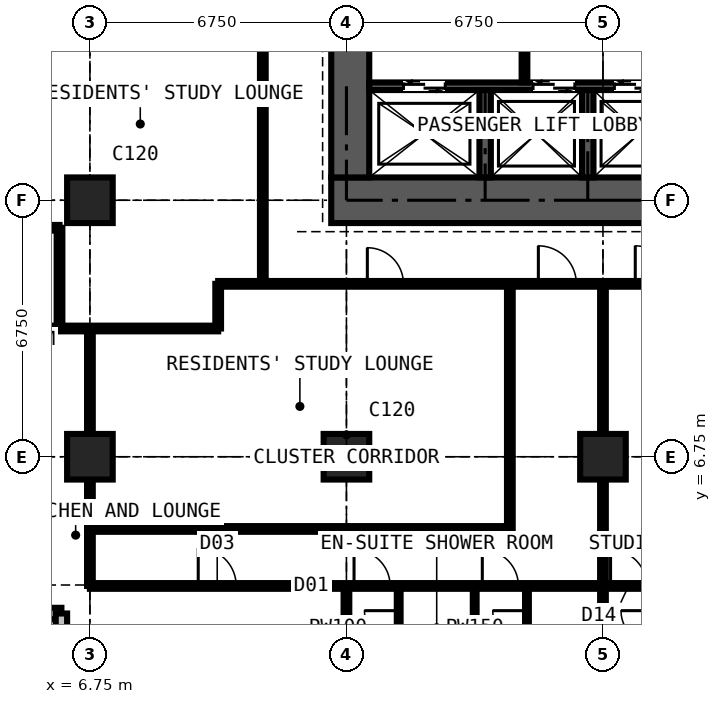
"""IFC4 building model, lengths in metres.
Left out: names, types, materials, properties, quantities, classifications, styles, units other than length and angle.
Written with IfcOpenShell. Run it as: python <this file> out.ifc"""

import sys

from ifc_helpers import new_model, si_unit, direction, frame, frame_2d, origin, origin_2d, place, context, subcontext, project, spatial, rectangle, extrude, element, fill, save


model = new_model("IFC4")
c1 = context("Model", 3, precision=1e-05, world=origin(), true_north=direction((0.0, 1.0)))
c2 = subcontext(c1, "Body", "Model", "MODEL_VIEW")
j1 = project(units=[si_unit("LENGTHUNIT", "METRE"), si_unit("PLANEANGLEUNIT", "RADIAN")], contexts=[c1])
p1 = place(None, origin())
s1 = spatial("IfcSite", under=j1, at=p1, CompositionType="ELEMENT")
p2 = place(p1, origin())
s2 = spatial("IfcBuilding", under=s1, at=p2, CompositionType="ELEMENT")
p3 = place(p2, frame((0.0, 0.0, 189.0)))
s3 = spatial("IfcBuildingStorey", under=s2, at=p3, CompositionType="ELEMENT", Elevation=189.0)
for number, where, z_axis, x_axis in (
    (1, (6.75, 6.75, 0.0), (0.0, 0.0, 1.0), (1.0, 0.0, 0.0)),
    (2, (6.75, 13.5, 0.0), (0.0, 0.0, 1.0), (1.0, 0.0, 0.0)),
    (3, (13.5, 6.75, 0.0), (0.0, 0.0, 1.0), (1.0, 0.0, 0.0)),
    (4, (20.25, 6.75, 0.0), (0.0, 0.0, 1.0), (1.0, 0.0, 0.0)),
):
    element("IfcColumn", number, at=place(p3, frame(where, z_axis=z_axis, x_axis=x_axis)), inside=s3, PredefinedType="COLUMN", context=c2, shape_type="SweptSolid", body=[
        extrude(rectangle(XDim=1.2, YDim=1.2, at=origin_2d()), origin(), (0.0, 0.0, 1.0), 3.6),
    ])
p4 = place(p3, frame((13.1, 13.5, 0.0), z_axis=(0.0, 0.0, 1.0), x_axis=(1.0, 0.0, 0.0)))
e5 = element("IfcWall", 5, at=p4, inside=s3, PredefinedType="SHEAR", context=c2, shape_type="SweptSolid", body=[
    extrude(rectangle(XDim=14.3, YDim=1.2, at=frame_2d((7.15, 0.0))), origin(), (0.0, 0.0, 1.0), 3.6),
])
p5 = place(p3, frame((13.6, 26.4, 0.0), z_axis=(0.0, 0.0, 1.0), x_axis=(0.0, -1.0, 0.0)))
e6 = element("IfcWall", 6, at=p5, inside=s3, PredefinedType="SHEAR", context=c2, shape_type="SweptSolid", body=[
    extrude(rectangle(XDim=12.3, YDim=1.0, at=frame_2d((6.15, 0.0))), origin(), (0.0, 0.0, 1.0), 3.6),
])
p6 = place(p5, frame((7.45, 0.0, 0.0)))
e7 = element("IfcOpeningElement", 7, at=p6, cuts=e6, PredefinedType="OPENING", context=c2, shape_type="SweptSolid", body=[
    extrude(rectangle(XDim=1.2, YDim=2.2, at=frame_2d((0.6, 1.1))), frame((0.0, 0.51, 0.0), z_axis=(0.0, -1.0, 0.0), x_axis=(1.0, 0.0, 0.0)), (0.0, 0.0, 1.0), 1.02),
])
p7 = place(p3, frame((2.625, 2.625, 0.0), z_axis=(0.0, 0.0, 1.0), x_axis=(1.0, 0.0, 0.0)))
e8 = element("IfcWall", 8, at=p7, inside=s3, PredefinedType="SOLIDWALL", context=c2, shape_type="SweptSolid", body=[
    extrude(rectangle(XDim=3.375, YDim=0.3, at=frame_2d((1.688, 0.0))), origin(), (0.0, 0.0, 1.0), 3.375),
])
p8 = place(p7, frame((0.788, 0.0, 0.6)))
e9 = element("IfcOpeningElement", 9, at=p8, cuts=e8, PredefinedType="OPENING", context=c2, shape_type="SweptSolid", body=[
    extrude(rectangle(XDim=1.8, YDim=2.1, at=frame_2d((0.9, 1.05))), frame((0.0, 0.16, 0.0), z_axis=(0.0, -1.0, 0.0), x_axis=(1.0, 0.0, 0.0)), (0.0, 0.0, 1.0), 0.32),
])
p9 = place(p3, frame((6.0, 2.625, 0.0), z_axis=(0.0, 0.0, 1.0), x_axis=(0.0, -1.0, 0.0)))
e10 = element("IfcWall", 10, at=p9, inside=s3, PredefinedType="SOLIDWALL", context=c2, shape_type="SweptSolid", body=[
    extrude(rectangle(XDim=3.375, YDim=0.3, at=frame_2d((1.688, 0.0))), origin(), (0.0, 0.0, 1.0), 3.375),
])
p10 = place(p9, frame((0.788, 0.0, 0.6)))
e11 = element("IfcOpeningElement", 11, at=p10, cuts=e10, PredefinedType="OPENING", context=c2, shape_type="SweptSolid", body=[
    extrude(rectangle(XDim=1.8, YDim=2.1, at=frame_2d((0.9, 1.05))), frame((0.0, 0.16, 0.0), z_axis=(0.0, -1.0, 0.0), x_axis=(1.0, 0.0, 0.0)), (0.0, 0.0, 1.0), 0.32),
])
p11 = place(p3, frame((14.1, 16.5, 0.0), z_axis=(0.0, 0.0, 1.0), x_axis=(1.0, 0.0, 0.0)))
e12 = element("IfcWall", 12, at=p11, inside=s3, PredefinedType="SHEAR", context=c2, shape_type="SweptSolid", body=[
    extrude(rectangle(XDim=12.3, YDim=0.2, at=frame_2d((6.15, 0.0))), origin(), (0.0, 0.0, 1.0), 3.6),
])
p12 = place(p11, frame((0.9, 0.0, 0.0)))
e13 = element("IfcOpeningElement", 13, at=p12, cuts=e12, PredefinedType="OPENING", context=c2, shape_type="SweptSolid", body=[
    extrude(rectangle(XDim=1.1, YDim=2.2, at=frame_2d((0.55, 1.1))), frame((0.0, 0.11, 0.0), z_axis=(0.0, -1.0, 0.0), x_axis=(1.0, 0.0, 0.0)), (0.0, 0.0, 1.0), 0.22),
])
p13 = place(p11, frame((4.31, 0.0, 0.0)))
e14 = element("IfcOpeningElement", 14, at=p13, cuts=e12, PredefinedType="OPENING", context=c2, shape_type="SweptSolid", body=[
    extrude(rectangle(XDim=1.1, YDim=2.2, at=frame_2d((0.55, 1.1))), frame((0.0, 0.11, 0.0), z_axis=(0.0, -1.0, 0.0), x_axis=(1.0, 0.0, 0.0)), (0.0, 0.0, 1.0), 0.22),
])
p14 = place(p11, frame((6.45, 0.0, 0.0)))
e15 = element("IfcOpeningElement", 15, at=p14, cuts=e12, PredefinedType="OPENING", context=c2, shape_type="SweptSolid", body=[
    extrude(rectangle(XDim=1.1, YDim=2.2, at=frame_2d((0.55, 1.1))), frame((0.0, 0.11, 0.0), z_axis=(0.0, -1.0, 0.0), x_axis=(1.0, 0.0, 0.0)), (0.0, 0.0, 1.0), 0.22),
])
p15 = place(p11, frame((9.5, 0.0, 0.0)))
e16 = element("IfcOpeningElement", 16, at=p15, cuts=e12, PredefinedType="OPENING", context=c2, shape_type="SweptSolid", body=[
    extrude(rectangle(XDim=1.1, YDim=2.2, at=frame_2d((0.55, 1.1))), frame((0.0, 0.11, 0.0), z_axis=(0.0, -1.0, 0.0), x_axis=(1.0, 0.0, 0.0)), (0.0, 0.0, 1.0), 0.22),
])
for number, where, z_axis, x_axis in (
    (17, (17.15, 14.1, 0.0), (0.0, 0.0, 1.0), (0.0, 1.0, 0.0)),
    (18, (19.85, 14.1, 0.0), (0.0, 0.0, 1.0), (0.0, 1.0, 0.0)),
):
    element("IfcWall", number, at=place(p3, frame(where, z_axis=z_axis, x_axis=x_axis)), inside=s3, PredefinedType="SHEAR", context=c2, shape_type="SweptSolid", body=[
        extrude(rectangle(XDim=2.3, YDim=0.3, at=frame_2d((1.15, 0.0))), origin(), (0.0, 0.0, 1.0), 3.6),
    ])
p16 = place(p3, frame((18.185, 16.6, 0.0), z_axis=(0.0, 0.0, 1.0), x_axis=(0.0, 1.0, 0.0)))
e19 = element("IfcWall", 19, at=p16, inside=s3, PredefinedType="PARTITIONING", context=c2, shape_type="SweptSolid", body=[
    extrude(rectangle(XDim=3.5, YDim=0.15, at=frame_2d((1.75, 0.0))), origin(), (0.0, 0.0, 1.0), 3.375),
])
p17 = place(p16, frame((1.15, 0.0, 0.0)))
e20 = element("IfcOpeningElement", 20, at=p17, cuts=e19, PredefinedType="OPENING", context=c2, shape_type="SweptSolid", body=[
    extrude(rectangle(XDim=1.2, YDim=2.2, at=frame_2d((0.6, 1.1))), frame((0.0, 0.085, 0.0), z_axis=(0.0, -1.0, 0.0), x_axis=(1.0, 0.0, 0.0)), (0.0, 0.0, 1.0), 0.17),
])
p18 = place(p3, frame((-0.734, 10.125, 0.0), z_axis=(0.0, 0.0, 1.0), x_axis=(1.0, 0.0, 0.0)))
e21 = element("IfcWall", 21, at=p18, inside=s3, PredefinedType="PARTITIONING", context=c2, shape_type="SweptSolid", body=[
    extrude(rectangle(XDim=10.859, YDim=0.15, at=frame_2d((5.429, 0.0))), origin(), (0.0, 0.0, 1.0), 3.375),
])
p19 = place(p3, frame((4.85, 12.775, 0.0), z_axis=(0.0, 0.0, 1.0), x_axis=(1.0, 0.0, 0.0)))
e22 = element("IfcWall", 22, at=p19, inside=s3, PredefinedType="PARTITIONING", context=c2, shape_type="SweptSolid", body=[
    extrude(rectangle(XDim=1.1, YDim=0.15, at=frame_2d((0.55, 0.0))), origin(), (0.0, 0.0, 1.0), 3.375),
])
p20 = place(p3, frame((5.95, 10.125, 0.0), z_axis=(0.0, 0.0, 1.0), x_axis=(0.0, 1.0, 0.0)))
e23 = element("IfcWall", 23, at=p20, inside=s3, PredefinedType="PARTITIONING", context=c2, shape_type="SweptSolid", body=[
    extrude(rectangle(XDim=2.65, YDim=0.15, at=frame_2d((1.325, 0.0))), origin(), (0.0, 0.0, 1.0), 3.375),
])
p21 = place(p3, frame((6.75, 3.35, 0.0), z_axis=(0.0, 0.0, 1.0), x_axis=(0.0, 1.0, 0.0)))
e24 = element("IfcWall", 24, at=p21, inside=s3, PredefinedType="PARTITIONING", context=c2, shape_type="SweptSolid", body=[
    extrude(rectangle(XDim=6.775, YDim=0.15, at=frame_2d((3.387, 0.0))), origin(), (0.0, 0.0, 1.0), 2.877),
])
p22 = place(p3, frame((6.75, 3.35, 0.0), z_axis=(0.0, 0.0, 1.0), x_axis=(1.0, 0.0, 0.0)))
e25 = element("IfcWall", 25, at=p22, inside=s3, PredefinedType="PARTITIONING", context=c2, shape_type="SweptSolid", body=[
    extrude(rectangle(XDim=20.25, YDim=0.15, at=frame_2d((10.125, 0.0))), origin(), (0.0, 0.0, 1.0), 3.375),
])
p23 = place(p22, frame((2.85, 0.0, 0.0)))
e26 = element("IfcOpeningElement", 26, at=p23, cuts=e25, PredefinedType="OPENING", context=c2, shape_type="SweptSolid", body=[
    extrude(rectangle(XDim=1.0, YDim=2.2, at=frame_2d((0.5, 1.1))), frame((0.0, 0.085, 0.0), z_axis=(0.0, -1.0, 0.0), x_axis=(1.0, 0.0, 0.0)), (0.0, 0.0, 1.0), 0.17),
])
p24 = place(p22, frame((6.95, 0.0, 0.0)))
e27 = element("IfcOpeningElement", 27, at=p24, cuts=e25, PredefinedType="OPENING", context=c2, shape_type="SweptSolid", body=[
    extrude(rectangle(XDim=0.95, YDim=2.2, at=frame_2d((0.475, 1.1))), frame((0.0, 0.085, 0.0), z_axis=(0.0, -1.0, 0.0), x_axis=(1.0, 0.0, 0.0)), (0.0, 0.0, 1.0), 0.17),
])
p25 = place(p22, frame((10.325, 0.0, 0.0)))
e28 = element("IfcOpeningElement", 28, at=p25, cuts=e25, PredefinedType="OPENING", context=c2, shape_type="SweptSolid", body=[
    extrude(rectangle(XDim=0.95, YDim=2.2, at=frame_2d((0.475, 1.1))), frame((0.0, 0.085, 0.0), z_axis=(0.0, -1.0, 0.0), x_axis=(1.0, 0.0, 0.0)), (0.0, 0.0, 1.0), 0.17),
])
p26 = place(p22, frame((13.7, 0.0, 0.0)))
e29 = element("IfcOpeningElement", 29, at=p26, cuts=e25, PredefinedType="OPENING", context=c2, shape_type="SweptSolid", body=[
    extrude(rectangle(XDim=0.95, YDim=2.2, at=frame_2d((0.475, 1.1))), frame((0.0, 0.085, 0.0), z_axis=(0.0, -1.0, 0.0), x_axis=(1.0, 0.0, 0.0)), (0.0, 0.0, 1.0), 0.17),
])
p27 = place(p22, frame((17.075, 0.0, 0.0)))
e30 = element("IfcOpeningElement", 30, at=p27, cuts=e25, PredefinedType="OPENING", context=c2, shape_type="SweptSolid", body=[
    extrude(rectangle(XDim=0.95, YDim=2.2, at=frame_2d((0.475, 1.1))), frame((0.0, 0.085, 0.0), z_axis=(0.0, -1.0, 0.0), x_axis=(1.0, 0.0, 0.0)), (0.0, 0.0, 1.0), 0.17),
])
p28 = place(p3, frame((6.75, 4.85, 0.0), z_axis=(0.0, 0.0, 1.0), x_axis=(1.0, 0.0, 0.0)))
e31 = element("IfcWall", 31, at=p28, inside=s3, PredefinedType="PARTITIONING", context=c2, shape_type="SweptSolid", body=[
    extrude(rectangle(XDim=11.05, YDim=0.15, at=frame_2d((5.525, 0.0))), origin(), (0.0, 0.0, 1.0), 3.375),
])
p29 = place(p3, frame((10.125, 10.125, 0.0), z_axis=(0.0, 0.0, 1.0), x_axis=(0.0, 1.0, 0.0)))
e32 = element("IfcWall", 32, at=p29, inside=s3, PredefinedType="PARTITIONING", context=c2, shape_type="SweptSolid", body=[
    extrude(rectangle(XDim=1.175, YDim=0.15, at=frame_2d((0.587, 0.0))), origin(), (0.0, 0.0, 1.0), 3.375),
])
p30 = place(p3, frame((10.125, 11.3, 0.0), z_axis=(0.0, 0.0, 1.0), x_axis=(1.0, 0.0, 0.0)))
e33 = element("IfcWall", 33, at=p30, inside=s3, PredefinedType="PARTITIONING", context=c2, shape_type="SweptSolid", body=[
    extrude(rectangle(XDim=20.475, YDim=0.15, at=frame_2d((10.238, 0.0))), origin(), (0.0, 0.0, 1.0), 3.375),
])
p31 = place(p30, frame((8.425, 0.0, 0.0)))
e34 = element("IfcOpeningElement", 34, at=p31, cuts=e33, PredefinedType="OPENING", context=c2, shape_type="SweptSolid", body=[
    extrude(rectangle(XDim=1.0, YDim=2.2, at=frame_2d((0.5, 1.1))), frame((0.0, 0.085, 0.0), z_axis=(0.0, -1.0, 0.0), x_axis=(1.0, 0.0, 0.0)), (0.0, 0.0, 1.0), 0.17),
])
p32 = place(p30, frame((10.975, 0.0, 0.0)))
e35 = element("IfcOpeningElement", 35, at=p32, cuts=e33, PredefinedType="OPENING", context=c2, shape_type="SweptSolid", body=[
    extrude(rectangle(XDim=1.0, YDim=2.2, at=frame_2d((0.5, 1.1))), frame((0.0, 0.085, 0.0), z_axis=(0.0, -1.0, 0.0), x_axis=(1.0, 0.0, 0.0)), (0.0, 0.0, 1.0), 0.17),
])
p33 = place(p30, frame((3.925, 0.0, 0.0)))
e36 = element("IfcOpeningElement", 36, at=p33, cuts=e33, PredefinedType="OPENING", context=c2, shape_type="SweptSolid", body=[
    extrude(rectangle(XDim=0.95, YDim=2.2, at=frame_2d((0.475, 1.1))), frame((0.0, 0.085, 0.0), z_axis=(0.0, -1.0, 0.0), x_axis=(1.0, 0.0, 0.0)), (0.0, 0.0, 1.0), 0.17),
])
p34 = place(p3, frame((11.3, 11.3, 0.0), z_axis=(0.0, 0.0, 1.0), x_axis=(0.0, 1.0, 0.0)))
e37 = element("IfcWall", 37, at=p34, inside=s3, PredefinedType="PARTITIONING", context=c2, shape_type="SweptSolid", body=[
    extrude(rectangle(XDim=19.3, YDim=0.15, at=frame_2d((9.65, 0.0))), origin(), (0.0, 0.0, 1.0), 3.375),
])
p35 = place(p34, frame((18.1, 0.0, 0.0)))
e38 = element("IfcOpeningElement", 38, at=p35, cuts=e37, PredefinedType="OPENING", context=c2, shape_type="SweptSolid", body=[
    extrude(rectangle(XDim=1.0, YDim=2.2, at=frame_2d((0.5, 1.1))), frame((0.0, 0.085, 0.0), z_axis=(0.0, -1.0, 0.0), x_axis=(1.0, 0.0, 0.0)), (0.0, 0.0, 1.0), 0.17),
])
p36 = place(p34, frame((10.137, 0.0, 0.0)))
e39 = element("IfcOpeningElement", 39, at=p36, cuts=e37, PredefinedType="OPENING", context=c2, shape_type="SweptSolid", body=[
    extrude(rectangle(XDim=1.0, YDim=2.2, at=frame_2d((0.5, 1.1))), frame((0.0, 0.085, 0.0), z_axis=(0.0, -1.0, 0.0), x_axis=(1.0, 0.0, 0.0)), (0.0, 0.0, 1.0), 0.17),
])
p37 = place(p3, frame((13.5, -0.734, 0.0), z_axis=(0.0, 0.0, 1.0), x_axis=(0.0, 1.0, 0.0)))
e40 = element("IfcWall", 40, at=p37, inside=s3, PredefinedType="PARTITIONING", context=c2, shape_type="SweptSolid", body=[
    extrude(rectangle(XDim=4.084, YDim=0.15, at=frame_2d((2.042, 0.0))), origin(), (0.0, 0.0, 1.0), 2.61),
])
p38 = place(p3, frame((14.875, 1.15, 0.0), z_axis=(0.0, 0.0, 1.0), x_axis=(0.0, 1.0, 0.0)))
e41 = element("IfcWall", 41, at=p38, inside=s3, PredefinedType="PARTITIONING", context=c2, shape_type="SweptSolid", body=[
    extrude(rectangle(XDim=2.2, YDim=0.1, at=frame_2d((1.1, 0.0))), origin(), (0.0, 0.0, 1.0), 3.375),
])
p39 = place(p38, frame((0.65, 0.0, 0.0)))
e42 = element("IfcOpeningElement", 42, at=p39, cuts=e41, PredefinedType="OPENING", context=c2, shape_type="SweptSolid", body=[
    extrude(rectangle(XDim=0.9, YDim=2.2, at=frame_2d((0.45, 1.1))), frame((0.0, 0.06, 0.0), z_axis=(0.0, -1.0, 0.0), x_axis=(1.0, 0.0, 0.0)), (0.0, 0.0, 1.0), 0.12),
])
p40 = place(p3, frame((16.875, -0.734, 0.0), z_axis=(0.0, 0.0, 1.0), x_axis=(0.0, 1.0, 0.0)))
e43 = element("IfcWall", 43, at=p40, inside=s3, PredefinedType="PARTITIONING", context=c2, shape_type="SweptSolid", body=[
    extrude(rectangle(XDim=4.084, YDim=0.1, at=frame_2d((2.042, 0.0))), origin(), (0.0, 0.0, 1.0), 3.375),
])
p41 = place(p3, frame((17.8, 4.85, 0.0), z_axis=(0.0, 0.0, 1.0), x_axis=(0.0, 1.0, 0.0)))
e44 = element("IfcWall", 44, at=p41, inside=s3, PredefinedType="PARTITIONING", context=c2, shape_type="SweptSolid", body=[
    extrude(rectangle(XDim=6.45, YDim=0.15, at=frame_2d((3.225, 0.0))), origin(), (0.0, 0.0, 1.0), 3.375),
])
p42 = place(p3, frame((18.25, 1.15, 0.0), z_axis=(0.0, 0.0, 1.0), x_axis=(0.0, 1.0, 0.0)))
e45 = element("IfcWall", 45, at=p42, inside=s3, PredefinedType="PARTITIONING", context=c2, shape_type="SweptSolid", body=[
    extrude(rectangle(XDim=2.2, YDim=0.1, at=frame_2d((1.1, 0.0))), origin(), (0.0, 0.0, 1.0), 3.375),
])
p43 = place(p42, frame((0.65, 0.0, 0.0)))
e46 = element("IfcOpeningElement", 46, at=p43, cuts=e45, PredefinedType="OPENING", context=c2, shape_type="SweptSolid", body=[
    extrude(rectangle(XDim=0.9, YDim=2.2, at=frame_2d((0.45, 1.1))), frame((0.0, 0.06, 0.0), z_axis=(0.0, -1.0, 0.0), x_axis=(1.0, 0.0, 0.0)), (0.0, 0.0, 1.0), 0.12),
])
p44 = place(p3, frame((20.25, -0.734, 0.0), z_axis=(0.0, 0.0, 1.0), x_axis=(0.0, 1.0, 0.0)))
e47 = element("IfcWall", 47, at=p44, inside=s3, PredefinedType="PARTITIONING", context=c2, shape_type="SweptSolid", body=[
    extrude(rectangle(XDim=12.034, YDim=0.15, at=frame_2d((6.017, 0.0))), origin(), (0.0, 0.0, 1.0), 2.61),
])
p45 = place(p12, origin())
e48 = element("IfcDoor", 48, at=p45, inside=s3, OperationType="DOUBLE_DOOR_SLIDING", PredefinedType="DOOR", context=c2, shape_type="SweptSolid", body=[
    extrude(rectangle(XDim=1.1, YDim=2.2, at=frame_2d((0.55, 1.1))), frame((0.0, 0.025, 0.0), z_axis=(0.0, -1.0, 0.0), x_axis=(1.0, 0.0, 0.0)), (0.0, 0.0, 1.0), 0.05),
])
fill(e13, e48)
p46 = place(p13, origin())
e49 = element("IfcDoor", 49, at=p46, inside=s3, OperationType="DOUBLE_DOOR_SLIDING", PredefinedType="DOOR", context=c2, shape_type="SweptSolid", body=[
    extrude(rectangle(XDim=1.1, YDim=2.2, at=frame_2d((0.55, 1.1))), frame((0.0, 0.025, 0.0), z_axis=(0.0, -1.0, 0.0), x_axis=(1.0, 0.0, 0.0)), (0.0, 0.0, 1.0), 0.05),
])
fill(e14, e49)
p47 = place(p14, origin())
e50 = element("IfcDoor", 50, at=p47, inside=s3, OperationType="DOUBLE_DOOR_SLIDING", PredefinedType="DOOR", context=c2, shape_type="SweptSolid", body=[
    extrude(rectangle(XDim=1.1, YDim=2.2, at=frame_2d((0.55, 1.1))), frame((0.0, 0.025, 0.0), z_axis=(0.0, -1.0, 0.0), x_axis=(1.0, 0.0, 0.0)), (0.0, 0.0, 1.0), 0.05),
])
fill(e15, e50)
p48 = place(p23, origin())
e51 = element("IfcDoor", 51, at=p48, inside=s3, OperationType="SINGLE_SWING_LEFT", PredefinedType="DOOR", context=c2, shape_type="SweptSolid", body=[
    extrude(rectangle(XDim=1.0, YDim=2.2, at=frame_2d((0.5, 1.1))), frame((0.0, 0.025, 0.0), z_axis=(0.0, -1.0, 0.0), x_axis=(1.0, 0.0, 0.0)), (0.0, 0.0, 1.0), 0.05),
])
fill(e26, e51)
p49 = place(p24, origin())
e52 = element("IfcDoor", 52, at=p49, inside=s3, OperationType="SINGLE_SWING_LEFT", PredefinedType="DOOR", context=c2, shape_type="SweptSolid", body=[
    extrude(rectangle(XDim=0.95, YDim=2.2, at=frame_2d((0.475, 1.1))), frame((0.0, 0.025, 0.0), z_axis=(0.0, -1.0, 0.0), x_axis=(1.0, 0.0, 0.0)), (0.0, 0.0, 1.0), 0.05),
])
fill(e27, e52)
p50 = place(p39, origin())
e53 = element("IfcDoor", 53, at=p50, inside=s3, OperationType="SINGLE_SWING_RIGHT", PredefinedType="DOOR", context=c2, shape_type="SweptSolid", body=[
    extrude(rectangle(XDim=0.9, YDim=2.2, at=frame_2d((0.45, 1.1))), frame((0.0, 0.025, 0.0), z_axis=(0.0, -1.0, 0.0), x_axis=(1.0, 0.0, 0.0)), (0.0, 0.0, 1.0), 0.05),
])
fill(e42, e53)
p51 = place(p25, origin())
e54 = element("IfcDoor", 54, at=p51, inside=s3, OperationType="SINGLE_SWING_LEFT", PredefinedType="DOOR", context=c2, shape_type="SweptSolid", body=[
    extrude(rectangle(XDim=0.95, YDim=2.2, at=frame_2d((0.475, 1.1))), frame((0.0, 0.025, 0.0), z_axis=(0.0, -1.0, 0.0), x_axis=(1.0, 0.0, 0.0)), (0.0, 0.0, 1.0), 0.05),
])
fill(e28, e54)
p52 = place(p43, origin())
e55 = element("IfcDoor", 55, at=p52, inside=s3, OperationType="SINGLE_SWING_RIGHT", PredefinedType="DOOR", context=c2, shape_type="SweptSolid", body=[
    extrude(rectangle(XDim=0.9, YDim=2.2, at=frame_2d((0.45, 1.1))), frame((0.0, 0.025, 0.0), z_axis=(0.0, -1.0, 0.0), x_axis=(1.0, 0.0, 0.0)), (0.0, 0.0, 1.0), 0.05),
])
fill(e46, e55)
p53 = place(p31, origin())
e56 = element("IfcDoor", 56, at=p53, inside=s3, OperationType="SINGLE_SWING_LEFT", PredefinedType="DOOR", context=c2, shape_type="SweptSolid", body=[
    extrude(rectangle(XDim=1.0, YDim=2.2, at=frame_2d((0.5, 1.1))), frame((0.0, 0.025, 0.0), z_axis=(0.0, -1.0, 0.0), x_axis=(1.0, 0.0, 0.0)), (0.0, 0.0, 1.0), 0.05),
])
fill(e34, e56)
p54 = place(p26, origin())
e57 = element("IfcDoor", 57, at=p54, inside=s3, OperationType="SINGLE_SWING_LEFT", PredefinedType="DOOR", context=c2, shape_type="SweptSolid", body=[
    extrude(rectangle(XDim=0.95, YDim=2.2, at=frame_2d((0.475, 1.1))), frame((0.0, 0.025, 0.0), z_axis=(0.0, -1.0, 0.0), x_axis=(1.0, 0.0, 0.0)), (0.0, 0.0, 1.0), 0.05),
])
fill(e29, e57)
p55 = place(p32, origin())
e58 = element("IfcDoor", 58, at=p55, inside=s3, OperationType="SINGLE_SWING_LEFT", PredefinedType="DOOR", context=c2, shape_type="SweptSolid", body=[
    extrude(rectangle(XDim=1.0, YDim=2.2, at=frame_2d((0.5, 1.1))), frame((0.0, 0.025, 0.0), z_axis=(0.0, -1.0, 0.0), x_axis=(1.0, 0.0, 0.0)), (0.0, 0.0, 1.0), 0.05),
])
fill(e35, e58)
p56 = place(p33, origin())
e59 = element("IfcDoor", 59, at=p56, inside=s3, OperationType="SINGLE_SWING_LEFT", PredefinedType="DOOR", context=c2, shape_type="SweptSolid", body=[
    extrude(rectangle(XDim=0.95, YDim=2.2, at=frame_2d((0.475, 1.1))), frame((0.0, 0.025, 0.0), z_axis=(0.0, -1.0, 0.0), x_axis=(1.0, 0.0, 0.0)), (0.0, 0.0, 1.0), 0.05),
])
fill(e36, e59)
save(model, sys.argv[1])
